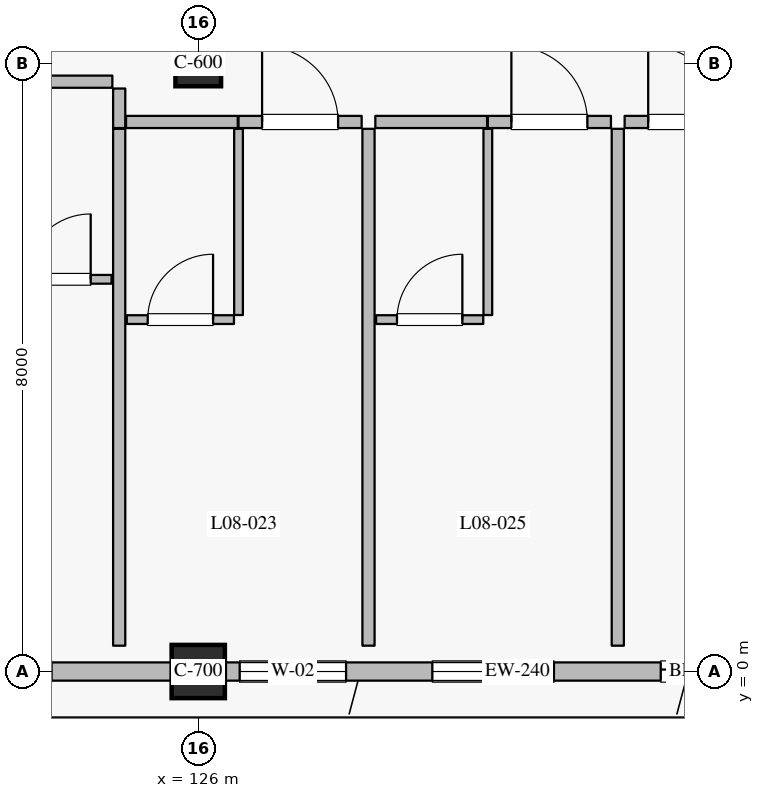
"""IFC4 building model, lengths in metres.
Left out: names, types, materials, properties, quantities, classifications, styles, units other than length and angle.
Written with IfcOpenShell. Run it as: python <this file> out.ifc"""

import sys

from ifc_helpers import new_model, si_unit, direction, frame, frame_2d, origin, origin_2d, place, context, subcontext, project, spatial, rectangle, extrude, element, fill, save


model = new_model("IFC4")
c1 = context("Model", 3, precision=1e-05, world=origin(), true_north=direction((0.0, 1.0)))
c2 = subcontext(c1, "Body", "Model", "MODEL_VIEW")
j1 = project(units=[si_unit("LENGTHUNIT", "METRE"), si_unit("PLANEANGLEUNIT", "RADIAN")], contexts=[c1])
p1 = place(None, origin())
s1 = spatial("IfcSite", under=j1, at=p1, CompositionType="ELEMENT")
p2 = place(p1, origin())
s2 = spatial("IfcBuilding", under=s1, at=p2, CompositionType="ELEMENT")
p3 = place(p2, frame((0.0, 0.0, 36.0)))
s3 = spatial("IfcBuildingStorey", under=s2, at=p3, CompositionType="ELEMENT", Elevation=36.0)
p4 = place(p3, frame((126.0, 0.0, 0.0), z_axis=(0.0, 0.0, 1.0), x_axis=(1.0, 0.0, 0.0)))
e1 = element("IfcColumn", 1, at=p4, inside=s3, PredefinedType="COLUMN", context=c2, shape_type="SweptSolid", body=[
    extrude(rectangle(XDim=0.7, YDim=0.7, at=origin_2d()), origin(), (0.0, 0.0, 1.0), 3.6),
])
p5 = place(p3, frame((126.0, 8.0, 0.0), z_axis=(0.0, 0.0, 1.0), x_axis=(1.0, 0.0, 0.0)))
e2 = element("IfcColumn", 2, at=p5, inside=s3, PredefinedType="COLUMN", context=c2, shape_type="SweptSolid", body=[
    extrude(rectangle(XDim=0.6, YDim=0.6, at=origin_2d()), origin(), (0.0, 0.0, 1.0), 3.6),
])
p6 = place(p3, frame((125.65, 0.0, 0.0), z_axis=(0.0, 0.0, 1.0), x_axis=(-1.0, 0.0, 0.0)))
e3 = element("IfcWall", 3, at=p6, inside=s3, PredefinedType="SOLIDWALL", context=c2, shape_type="SweptSolid", body=[
    extrude(rectangle(XDim=7.7, YDim=0.24, at=frame_2d((3.85, 0.0))), origin(), (0.0, 0.0, 1.0), 2.94),
])
p7 = place(p6, frame((1.58, 0.0, 0.0)))
e4 = element("IfcOpeningElement", 4, at=p7, cuts=e3, PredefinedType="OPENING", context=c2, shape_type="SweptSolid", body=[
    extrude(rectangle(XDim=1.5, YDim=2.25, at=frame_2d((0.75, 1.125))), frame((0.0, 0.13, 0.0), z_axis=(0.0, -1.0, 0.0), x_axis=(1.0, 0.0, 0.0)), (0.0, 0.0, 1.0), 0.26),
])
p8 = place(p6, frame((4.81, 0.0, 0.8)))
e5 = element("IfcOpeningElement", 5, at=p8, cuts=e3, PredefinedType="OPENING", context=c2, shape_type="SweptSolid", body=[
    extrude(rectangle(XDim=1.6, YDim=1.6, at=frame_2d((0.8, 0.8))), frame((0.0, 0.13, 0.0), z_axis=(0.0, -1.0, 0.0), x_axis=(1.0, 0.0, 0.0)), (0.0, 0.0, 1.0), 0.26),
])
p9 = place(p3, frame((134.05, 0.0, 0.0), z_axis=(0.0, 0.0, 1.0), x_axis=(-1.0, 0.0, 0.0)))
e6 = element("IfcWall", 6, at=p9, inside=s3, PredefinedType="SOLIDWALL", context=c2, shape_type="SweptSolid", body=[
    extrude(rectangle(XDim=7.7, YDim=0.24, at=frame_2d((3.85, 0.0))), origin(), (0.0, 0.0, 1.0), 2.94),
])
p10 = place(p9, frame((0.465, 0.0, 0.0)))
e7 = element("IfcOpeningElement", 7, at=p10, cuts=e6, PredefinedType="OPENING", context=c2, shape_type="SweptSolid", body=[
    extrude(rectangle(XDim=1.5, YDim=2.25, at=frame_2d((0.75, 1.125))), frame((0.0, 0.13, 0.0), z_axis=(0.0, -1.0, 0.0), x_axis=(1.0, 0.0, 0.0)), (0.0, 0.0, 1.0), 0.26),
])
p11 = place(p9, frame((3.37, 0.0, 0.8)))
e8 = element("IfcOpeningElement", 8, at=p11, cuts=e6, PredefinedType="OPENING", context=c2, shape_type="SweptSolid", body=[
    extrude(rectangle(XDim=1.6, YDim=1.6, at=frame_2d((0.8, 0.8))), frame((0.0, 0.13, 0.0), z_axis=(0.0, -1.0, 0.0), x_axis=(1.0, 0.0, 0.0)), (0.0, 0.0, 1.0), 0.26),
])
p12 = place(p9, frame((6.105, 0.0, 0.8)))
e9 = element("IfcOpeningElement", 9, at=p12, cuts=e6, PredefinedType="OPENING", context=c2, shape_type="SweptSolid", body=[
    extrude(rectangle(XDim=1.4, YDim=1.6, at=frame_2d((0.7, 0.8))), frame((0.0, 0.13, 0.0), z_axis=(0.0, -1.0, 0.0), x_axis=(1.0, 0.0, 0.0)), (0.0, 0.0, 1.0), 0.26),
])
p13 = place(p3, frame((123.4, 7.76, 0.0), z_axis=(0.0, 0.0, 1.0), x_axis=(1.0, 0.0, 0.0)))
e10 = element("IfcWall", 10, at=p13, inside=s3, PredefinedType="PARTITIONING", context=c2, shape_type="SweptSolid", body=[
    extrude(rectangle(XDim=1.47, YDim=0.16, at=frame_2d((0.735, 0.0))), origin(), (0.0, 0.0, 1.0), 3.365),
])
p14 = place(p3, frame((123.45, 5.16, 0.0), z_axis=(0.0, 0.0, 1.0), x_axis=(1.0, 0.0, 0.0)))
e11 = element("IfcWall", 11, at=p14, inside=s3, PredefinedType="PARTITIONING", context=c2, shape_type="SweptSolid", body=[
    extrude(rectangle(XDim=1.41, YDim=0.115, at=frame_2d((0.705, 0.0))), origin(), (0.0, 0.0, 1.0), 3.365),
])
p15 = place(p14, frame((0.275, 0.0, 0.0)))
e12 = element("IfcOpeningElement", 12, at=p15, cuts=e11, PredefinedType="OPENING", context=c2, shape_type="SweptSolid", body=[
    extrude(rectangle(XDim=0.86, YDim=2.12, at=frame_2d((0.43, 1.06))), frame((0.0, 0.067, 0.0), z_axis=(0.0, -1.0, 0.0), x_axis=(1.0, 0.0, 0.0)), (0.0, 0.0, 1.0), 0.135),
])
p16 = place(p3, frame((124.96, 7.15, 0.0), z_axis=(0.0, 0.0, 1.0), x_axis=(0.0, 1.0, 0.0)))
e13 = element("IfcWall", 13, at=p16, inside=s3, PredefinedType="PARTITIONING", context=c2, shape_type="SweptSolid", body=[
    extrude(rectangle(XDim=0.52, YDim=0.16, at=frame_2d((0.26, 0.0))), origin(), (0.0, 0.0, 1.0), 3.365),
])
p17 = place(p3, frame((125.05, 7.23, 0.0), z_axis=(0.0, 0.0, 1.0), x_axis=(1.0, 0.0, 0.0)))
e14 = element("IfcWall", 14, at=p17, inside=s3, PredefinedType="PARTITIONING", context=c2, shape_type="SweptSolid", body=[
    extrude(rectangle(XDim=1.47, YDim=0.16, at=frame_2d((0.735, 0.0))), origin(), (0.0, 0.0, 1.0), 3.365),
])
p18 = place(p3, frame((126.53, 7.23, 0.0), z_axis=(0.0, 0.0, 1.0), x_axis=(1.0, 0.0, 0.0)))
e15 = element("IfcWall", 15, at=p18, inside=s3, PredefinedType="PARTITIONING", context=c2, shape_type="SweptSolid", body=[
    extrude(rectangle(XDim=1.62, YDim=0.16, at=frame_2d((0.81, 0.0))), origin(), (0.0, 0.0, 1.0), 3.365),
])
p19 = place(p18, frame((0.31, 0.0, 0.0)))
e16 = element("IfcOpeningElement", 16, at=p19, cuts=e15, PredefinedType="OPENING", context=c2, shape_type="SweptSolid", body=[
    extrude(rectangle(XDim=1.0, YDim=2.25, at=frame_2d((0.5, 1.125))), frame((0.0, 0.09, 0.0), z_axis=(0.0, -1.0, 0.0), x_axis=(1.0, 0.0, 0.0)), (0.0, 0.0, 1.0), 0.18),
])
p20 = place(p3, frame((126.53, 4.69, 0.0), z_axis=(0.0, 0.0, 1.0), x_axis=(0.0, 1.0, 0.0)))
e17 = element("IfcWall", 17, at=p20, inside=s3, PredefinedType="PARTITIONING", context=c2, shape_type="SweptSolid", body=[
    extrude(rectangle(XDim=2.45, YDim=0.115, at=frame_2d((1.225, 0.0))), origin(), (0.0, 0.0, 1.0), 3.365),
])
p21 = place(p3, frame((125.06, 4.63, 0.0), z_axis=(0.0, 0.0, 1.0), x_axis=(1.0, 0.0, 0.0)))
e18 = element("IfcWall", 18, at=p21, inside=s3, PredefinedType="PARTITIONING", context=c2, shape_type="SweptSolid", body=[
    extrude(rectangle(XDim=1.41, YDim=0.115, at=frame_2d((0.705, 0.0))), origin(), (0.0, 0.0, 1.0), 3.365),
])
p22 = place(p21, frame((0.275, 0.0, 0.0)))
e19 = element("IfcOpeningElement", 19, at=p22, cuts=e18, PredefinedType="OPENING", context=c2, shape_type="SweptSolid", body=[
    extrude(rectangle(XDim=0.86, YDim=2.12, at=frame_2d((0.43, 1.06))), frame((0.0, 0.067, 0.0), z_axis=(0.0, -1.0, 0.0), x_axis=(1.0, 0.0, 0.0)), (0.0, 0.0, 1.0), 0.135),
])
p23 = place(p3, frame((124.96, 0.34, 0.0), z_axis=(0.0, 0.0, 1.0), x_axis=(0.0, 1.0, 0.0)))
e20 = element("IfcWall", 20, at=p23, inside=s3, PredefinedType="PARTITIONING", context=c2, shape_type="SweptSolid", body=[
    extrude(rectangle(XDim=6.8, YDim=0.16, at=frame_2d((3.4, 0.0))), origin(), (0.0, 0.0, 1.0), 3.365),
])
p24 = place(p3, frame((128.33, 7.23, 0.0), z_axis=(0.0, 0.0, 1.0), x_axis=(1.0, 0.0, 0.0)))
e21 = element("IfcWall", 21, at=p24, inside=s3, PredefinedType="PARTITIONING", context=c2, shape_type="SweptSolid", body=[
    extrude(rectangle(XDim=1.47, YDim=0.16, at=frame_2d((0.735, 0.0))), origin(), (0.0, 0.0, 1.0), 3.365),
])
p25 = place(p3, frame((129.81, 7.23, 0.0), z_axis=(0.0, 0.0, 1.0), x_axis=(1.0, 0.0, 0.0)))
e22 = element("IfcWall", 22, at=p25, inside=s3, PredefinedType="PARTITIONING", context=c2, shape_type="SweptSolid", body=[
    extrude(rectangle(XDim=1.62, YDim=0.16, at=frame_2d((0.81, 0.0))), origin(), (0.0, 0.0, 1.0), 3.365),
])
p26 = place(p25, frame((0.31, 0.0, 0.0)))
e23 = element("IfcOpeningElement", 23, at=p26, cuts=e22, PredefinedType="OPENING", context=c2, shape_type="SweptSolid", body=[
    extrude(rectangle(XDim=1.0, YDim=2.25, at=frame_2d((0.5, 1.125))), frame((0.0, 0.09, 0.0), z_axis=(0.0, -1.0, 0.0), x_axis=(1.0, 0.0, 0.0)), (0.0, 0.0, 1.0), 0.18),
])
p27 = place(p3, frame((129.81, 4.69, 0.0), z_axis=(0.0, 0.0, 1.0), x_axis=(0.0, 1.0, 0.0)))
e24 = element("IfcWall", 24, at=p27, inside=s3, PredefinedType="PARTITIONING", context=c2, shape_type="SweptSolid", body=[
    extrude(rectangle(XDim=2.45, YDim=0.115, at=frame_2d((1.225, 0.0))), origin(), (0.0, 0.0, 1.0), 3.365),
])
p28 = place(p3, frame((128.34, 4.63, 0.0), z_axis=(0.0, 0.0, 1.0), x_axis=(1.0, 0.0, 0.0)))
e25 = element("IfcWall", 25, at=p28, inside=s3, PredefinedType="PARTITIONING", context=c2, shape_type="SweptSolid", body=[
    extrude(rectangle(XDim=1.41, YDim=0.115, at=frame_2d((0.705, 0.0))), origin(), (0.0, 0.0, 1.0), 3.365),
])
p29 = place(p28, frame((0.275, 0.0, 0.0)))
e26 = element("IfcOpeningElement", 26, at=p29, cuts=e25, PredefinedType="OPENING", context=c2, shape_type="SweptSolid", body=[
    extrude(rectangle(XDim=0.86, YDim=2.12, at=frame_2d((0.43, 1.06))), frame((0.0, 0.067, 0.0), z_axis=(0.0, -1.0, 0.0), x_axis=(1.0, 0.0, 0.0)), (0.0, 0.0, 1.0), 0.135),
])
p30 = place(p3, frame((128.24, 0.34, 0.0), z_axis=(0.0, 0.0, 1.0), x_axis=(0.0, 1.0, 0.0)))
e27 = element("IfcWall", 27, at=p30, inside=s3, PredefinedType="PARTITIONING", context=c2, shape_type="SweptSolid", body=[
    extrude(rectangle(XDim=6.8, YDim=0.16, at=frame_2d((3.4, 0.0))), origin(), (0.0, 0.0, 1.0), 3.365),
])
p31 = place(p3, frame((131.61, 7.23, 0.0), z_axis=(0.0, 0.0, 1.0), x_axis=(1.0, 0.0, 0.0)))
e28 = element("IfcWall", 28, at=p31, inside=s3, PredefinedType="PARTITIONING", context=c2, shape_type="SweptSolid", body=[
    extrude(rectangle(XDim=1.62, YDim=0.16, at=frame_2d((0.81, 0.0))), origin(), (0.0, 0.0, 1.0), 3.365),
])
p32 = place(p31, frame((0.31, 0.0, 0.0)))
e29 = element("IfcOpeningElement", 29, at=p32, cuts=e28, PredefinedType="OPENING", context=c2, shape_type="SweptSolid", body=[
    extrude(rectangle(XDim=1.0, YDim=2.25, at=frame_2d((0.5, 1.125))), frame((0.0, 0.09, 0.0), z_axis=(0.0, -1.0, 0.0), x_axis=(1.0, 0.0, 0.0)), (0.0, 0.0, 1.0), 0.18),
])
p33 = place(p3, frame((131.52, 0.34, 0.0), z_axis=(0.0, 0.0, 1.0), x_axis=(0.0, 1.0, 0.0)))
e30 = element("IfcWall", 30, at=p33, inside=s3, PredefinedType="PARTITIONING", context=c2, shape_type="SweptSolid", body=[
    extrude(rectangle(XDim=6.8, YDim=0.16, at=frame_2d((3.4, 0.0))), origin(), (0.0, 0.0, 1.0), 3.365),
])
p34 = place(p10, origin())
e31 = element("IfcDoor", 31, at=p34, inside=s3, OperationType="SLIDING_TO_LEFT", PredefinedType="DOOR", context=c2, shape_type="SweptSolid", body=[
    extrude(rectangle(XDim=1.5, YDim=2.25, at=frame_2d((0.75, 1.125))), frame((0.0, 0.025, 0.0), z_axis=(0.0, -1.0, 0.0), x_axis=(1.0, 0.0, 0.0)), (0.0, 0.0, 1.0), 0.05),
])
fill(e7, e31)
p35 = place(p11, origin())
e32 = element("IfcWindow", 32, at=p35, inside=s3, PartitioningType="SINGLE_PANEL", PredefinedType="WINDOW", context=c2, shape_type="SweptSolid", body=[
    extrude(rectangle(XDim=1.6, YDim=1.6, at=frame_2d((0.8, 0.8))), frame((0.0, 0.03, 0.0), z_axis=(0.0, -1.0, 0.0), x_axis=(1.0, 0.0, 0.0)), (0.0, 0.0, 1.0), 0.06),
])
fill(e8, e32)
p36 = place(p12, origin())
e33 = element("IfcWindow", 33, at=p36, inside=s3, PartitioningType="SINGLE_PANEL", PredefinedType="WINDOW", context=c2, shape_type="SweptSolid", body=[
    extrude(rectangle(XDim=1.4, YDim=1.6, at=frame_2d((0.7, 0.8))), frame((0.0, 0.03, 0.0), z_axis=(0.0, -1.0, 0.0), x_axis=(1.0, 0.0, 0.0)), (0.0, 0.0, 1.0), 0.06),
])
fill(e9, e33)
p37 = place(p15, origin())
e34 = element("IfcDoor", 34, at=p37, inside=s3, OperationType="SINGLE_SWING_RIGHT", PredefinedType="DOOR", context=c2, shape_type="SweptSolid", body=[
    extrude(rectangle(XDim=0.86, YDim=2.12, at=frame_2d((0.43, 1.06))), frame((0.0, 0.025, 0.0), z_axis=(0.0, -1.0, 0.0), x_axis=(1.0, 0.0, 0.0)), (0.0, 0.0, 1.0), 0.05),
])
fill(e12, e34)
p38 = place(p19, origin())
e35 = element("IfcDoor", 35, at=p38, inside=s3, OperationType="SINGLE_SWING_LEFT", PredefinedType="DOOR", context=c2, shape_type="SweptSolid", body=[
    extrude(rectangle(XDim=1.0, YDim=2.25, at=frame_2d((0.5, 1.125))), frame((0.0, 0.025, 0.0), z_axis=(0.0, -1.0, 0.0), x_axis=(1.0, 0.0, 0.0)), (0.0, 0.0, 1.0), 0.05),
])
fill(e16, e35)
p39 = place(p22, origin())
e36 = element("IfcDoor", 36, at=p39, inside=s3, OperationType="SINGLE_SWING_RIGHT", PredefinedType="DOOR", context=c2, shape_type="SweptSolid", body=[
    extrude(rectangle(XDim=0.86, YDim=2.12, at=frame_2d((0.43, 1.06))), frame((0.0, 0.025, 0.0), z_axis=(0.0, -1.0, 0.0), x_axis=(1.0, 0.0, 0.0)), (0.0, 0.0, 1.0), 0.05),
])
fill(e19, e36)
p40 = place(p26, origin())
e37 = element("IfcDoor", 37, at=p40, inside=s3, OperationType="SINGLE_SWING_LEFT", PredefinedType="DOOR", context=c2, shape_type="SweptSolid", body=[
    extrude(rectangle(XDim=1.0, YDim=2.25, at=frame_2d((0.5, 1.125))), frame((0.0, 0.025, 0.0), z_axis=(0.0, -1.0, 0.0), x_axis=(1.0, 0.0, 0.0)), (0.0, 0.0, 1.0), 0.05),
])
fill(e23, e37)
p41 = place(p29, origin())
e38 = element("IfcDoor", 38, at=p41, inside=s3, OperationType="SINGLE_SWING_RIGHT", PredefinedType="DOOR", context=c2, shape_type="SweptSolid", body=[
    extrude(rectangle(XDim=0.86, YDim=2.12, at=frame_2d((0.43, 1.06))), frame((0.0, 0.025, 0.0), z_axis=(0.0, -1.0, 0.0), x_axis=(1.0, 0.0, 0.0)), (0.0, 0.0, 1.0), 0.05),
])
fill(e26, e38)
p42 = place(p32, origin())
e39 = element("IfcDoor", 39, at=p42, inside=s3, OperationType="SINGLE_SWING_LEFT", PredefinedType="DOOR", context=c2, shape_type="SweptSolid", body=[
    extrude(rectangle(XDim=1.0, YDim=2.25, at=frame_2d((0.5, 1.125))), frame((0.0, 0.025, 0.0), z_axis=(0.0, -1.0, 0.0), x_axis=(1.0, 0.0, 0.0)), (0.0, 0.0, 1.0), 0.05),
])
fill(e29, e39)
save(model, sys.argv[1])
